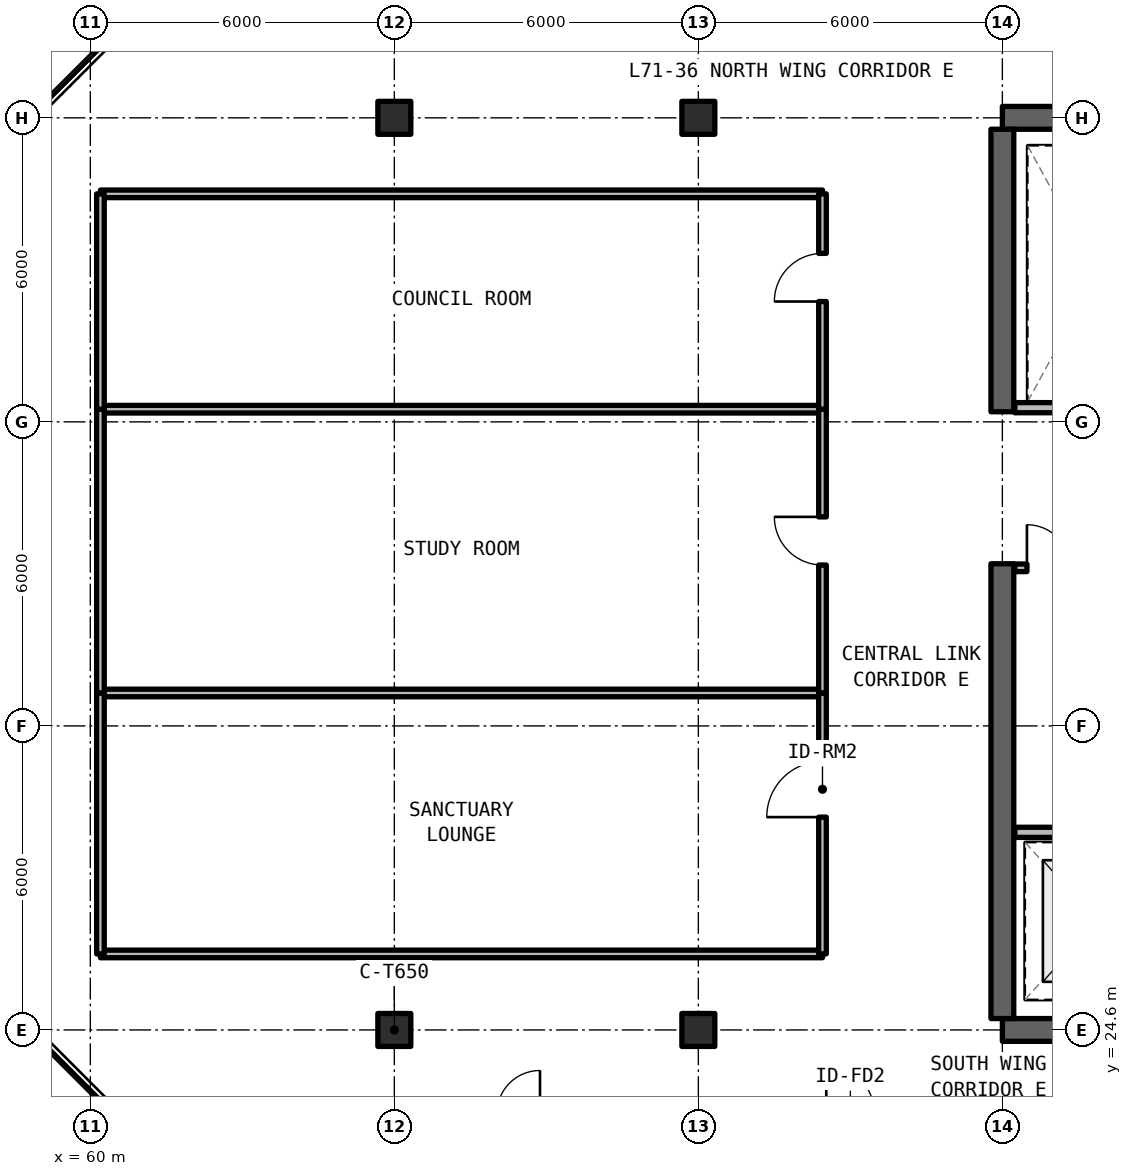
"""IFC4 building model, lengths in metres.
Left out: names, types, materials, properties, quantities, classifications, styles, units other than length and angle.
Written with IfcOpenShell. Run it as: python <this file> out.ifc"""

import sys

from ifc_helpers import new_model, si_unit, direction, frame, frame_2d, origin, origin_2d, place, context, subcontext, project, spatial, rectangle, extrude, element, fill, save


model = new_model("IFC4")
c1 = context("Model", 3, precision=1e-05, world=origin(), true_north=direction((0.0, 1.0)))
c2 = subcontext(c1, "Body", "Model", "MODEL_VIEW")
j1 = project(units=[si_unit("LENGTHUNIT", "METRE"), si_unit("PLANEANGLEUNIT", "RADIAN")], contexts=[c1])
p1 = place(None, origin())
s1 = spatial("IfcSite", under=j1, at=p1, CompositionType="ELEMENT")
p2 = place(p1, origin())
s2 = spatial("IfcBuilding", under=s1, at=p2, CompositionType="ELEMENT")
p3 = place(p2, frame((0.0, 0.0, 253.44)))
s3 = spatial("IfcBuildingStorey", under=s2, at=p3, CompositionType="ELEMENT", Elevation=253.44)
for number, where, z_axis, x_axis in (
    (1, (78.0, 24.6, 0.0), (0.0, 0.0, 1.0), (1.0, 0.0, 0.0)),
    (2, (90.0, 42.6, 0.0), (0.0, 0.0, 1.0), (-1.0, 0.0, 0.0)),
):
    element("IfcWall", number, at=place(p3, frame(where, z_axis=z_axis, x_axis=x_axis)), inside=s3, PredefinedType="SHEAR", context=c2, shape_type="SweptSolid", body=[
        extrude(rectangle(XDim=12.0, YDim=0.45, at=frame_2d((6.0, 0.0))), origin(), (0.0, 0.0, 1.0), 3.63),
    ])
p4 = place(p3, frame((78.0, 24.825, 0.0), z_axis=(0.0, 0.0, 1.0), x_axis=(0.0, 1.0, 0.0)))
e3 = element("IfcWall", 3, at=p4, inside=s3, PredefinedType="SHEAR", context=c2, shape_type="SweptSolid", body=[
    extrude(rectangle(XDim=8.975, YDim=0.45, at=frame_2d((4.488, 0.0))), origin(), (0.0, 0.0, 1.0), 3.63),
])
p5 = place(p3, frame((78.0, 36.8, 0.0), z_axis=(0.0, 0.0, 1.0), x_axis=(0.0, 1.0, 0.0)))
e4 = element("IfcWall", 4, at=p5, inside=s3, PredefinedType="SHEAR", context=c2, shape_type="SweptSolid", body=[
    extrude(rectangle(XDim=5.575, YDim=0.45, at=frame_2d((2.788, 0.0))), origin(), (0.0, 0.0, 1.0), 3.63),
])
for number, where, z_axis, x_axis in (
    (5, (66.0, 24.6, 0.0), (0.0, 0.0, 1.0), (1.0, 0.0, 0.0)),
    (6, (66.0, 42.6, 0.0), (0.0, 0.0, 1.0), (1.0, 0.0, 0.0)),
    (7, (72.0, 24.6, 0.0), (0.0, 0.0, 1.0), (1.0, 0.0, 0.0)),
    (8, (72.0, 42.6, 0.0), (0.0, 0.0, 1.0), (1.0, 0.0, 0.0)),
):
    element("IfcColumn", number, at=place(p3, frame(where, z_axis=z_axis, x_axis=x_axis)), inside=s3, PredefinedType="COLUMN", context=c2, shape_type="SweptSolid", body=[
        extrude(rectangle(XDim=0.65, YDim=0.65, at=origin_2d()), origin(), (0.0, 0.0, 1.0), 3.63),
    ])
p6 = place(p3, frame((78.245, 28.5, 0.0), z_axis=(0.0, 0.0, 1.0), x_axis=(1.0, 0.0, 0.0)))
e9 = element("IfcWall", 9, at=p6, inside=s3, PredefinedType="SOLIDWALL", context=c2, shape_type="SweptSolid", body=[
    extrude(rectangle(XDim=7.585, YDim=0.2, at=frame_2d((3.792, 0.0))), origin(), (0.0, 0.0, 1.0), 2.63),
])
p7 = place(p6, frame((3.555, 0.0, 0.0)))
e10 = element("IfcOpeningElement", 10, at=p7, cuts=e9, PredefinedType="OPENING", context=c2, shape_type="SweptSolid", body=[
    extrude(rectangle(XDim=1.0, YDim=2.15, at=frame_2d((0.5, 1.075))), frame((0.0, 0.11, 0.0), z_axis=(0.0, -1.0, 0.0), x_axis=(1.0, 0.0, 0.0)), (0.0, 0.0, 1.0), 0.22),
])
p8 = place(p3, frame((78.245, 33.72, 0.0), z_axis=(0.0, 0.0, 1.0), x_axis=(1.0, 0.0, 0.0)))
e11 = element("IfcWall", 11, at=p8, inside=s3, PredefinedType="SOLIDWALL", context=c2, shape_type="SweptSolid", body=[
    extrude(rectangle(XDim=1.395, YDim=0.15, at=frame_2d((0.697, 0.0))), origin(), (0.0, 0.0, 1.0), 2.63),
])
p9 = place(p8, frame((0.24, 0.0, 0.0)))
e12 = element("IfcOpeningElement", 12, at=p9, cuts=e11, PredefinedType="OPENING", context=c2, shape_type="SweptSolid", body=[
    extrude(rectangle(XDim=0.85, YDim=2.1, at=frame_2d((0.425, 1.05))), frame((0.0, 0.085, 0.0), z_axis=(0.0, -1.0, 0.0), x_axis=(1.0, 0.0, 0.0)), (0.0, 0.0, 1.0), 0.17),
])
p10 = place(p3, frame((78.245, 36.88, 0.0), z_axis=(0.0, 0.0, 1.0), x_axis=(1.0, 0.0, 0.0)))
e13 = element("IfcWall", 13, at=p10, inside=s3, PredefinedType="SOLIDWALL", context=c2, shape_type="SweptSolid", body=[
    extrude(rectangle(XDim=3.075, YDim=0.2, at=frame_2d((1.538, 0.0))), origin(), (0.0, 0.0, 1.0), 2.63),
])
for number, where, z_axis, x_axis in (
    (14, (60.2, 26.1, 0.0), (0.0, 0.0, 1.0), (1.0, 0.0, 0.0)),
    (15, (60.2, 31.25, 0.0), (0.0, 0.0, 1.0), (1.0, 0.0, 0.0)),
):
    element("IfcWall", number, at=place(p3, frame(where, z_axis=z_axis, x_axis=x_axis)), inside=s3, PredefinedType="SOLIDWALL", context=c2, shape_type="SweptSolid", body=[
        extrude(rectangle(XDim=14.25, YDim=0.15, at=frame_2d((7.125, 0.0))), origin(), (0.0, 0.0, 1.0), 2.63),
    ])
p11 = place(p3, frame((60.2, 26.1, 0.0), z_axis=(0.0, 0.0, 1.0), x_axis=(0.0, 1.0, 0.0)))
e16 = element("IfcWall", 16, at=p11, inside=s3, PredefinedType="SOLIDWALL", context=c2, shape_type="SweptSolid", body=[
    extrude(rectangle(XDim=5.15, YDim=0.15, at=frame_2d((2.575, 0.0))), origin(), (0.0, 0.0, 1.0), 2.63),
])
p12 = place(p3, frame((74.45, 26.1, 0.0), z_axis=(0.0, 0.0, 1.0), x_axis=(0.0, 1.0, 0.0)))
e17 = element("IfcWall", 17, at=p12, inside=s3, PredefinedType="SOLIDWALL", context=c2, shape_type="SweptSolid", body=[
    extrude(rectangle(XDim=5.15, YDim=0.15, at=frame_2d((2.575, 0.0))), origin(), (0.0, 0.0, 1.0), 2.63),
])
p13 = place(p12, frame((2.7, 0.0, 0.0)))
e18 = element("IfcOpeningElement", 18, at=p13, cuts=e17, PredefinedType="OPENING", context=c2, shape_type="SweptSolid", body=[
    extrude(rectangle(XDim=1.1, YDim=2.15, at=frame_2d((0.55, 1.075))), frame((0.0, 0.085, 0.0), z_axis=(0.0, -1.0, 0.0), x_axis=(1.0, 0.0, 0.0)), (0.0, 0.0, 1.0), 0.17),
])
p14 = place(p3, frame((60.2, 36.85, 0.0), z_axis=(0.0, 0.0, 1.0), x_axis=(1.0, 0.0, 0.0)))
e19 = element("IfcWall", 19, at=p14, inside=s3, PredefinedType="SOLIDWALL", context=c2, shape_type="SweptSolid", body=[
    extrude(rectangle(XDim=14.25, YDim=0.15, at=frame_2d((7.125, 0.0))), origin(), (0.0, 0.0, 1.0), 2.63),
])
p15 = place(p3, frame((60.2, 31.25, 0.0), z_axis=(0.0, 0.0, 1.0), x_axis=(0.0, 1.0, 0.0)))
e20 = element("IfcWall", 20, at=p15, inside=s3, PredefinedType="SOLIDWALL", context=c2, shape_type="SweptSolid", body=[
    extrude(rectangle(XDim=5.6, YDim=0.15, at=frame_2d((2.8, 0.0))), origin(), (0.0, 0.0, 1.0), 2.63),
])
p16 = place(p3, frame((74.45, 31.25, 0.0), z_axis=(0.0, 0.0, 1.0), x_axis=(0.0, 1.0, 0.0)))
e21 = element("IfcWall", 21, at=p16, inside=s3, PredefinedType="SOLIDWALL", context=c2, shape_type="SweptSolid", body=[
    extrude(rectangle(XDim=5.6, YDim=0.15, at=frame_2d((2.8, 0.0))), origin(), (0.0, 0.0, 1.0), 2.63),
])
p17 = place(p16, frame((2.525, 0.0, 0.0)))
e22 = element("IfcOpeningElement", 22, at=p17, cuts=e21, PredefinedType="OPENING", context=c2, shape_type="SweptSolid", body=[
    extrude(rectangle(XDim=0.95, YDim=2.15, at=frame_2d((0.475, 1.075))), frame((0.0, 0.085, 0.0), z_axis=(0.0, -1.0, 0.0), x_axis=(1.0, 0.0, 0.0)), (0.0, 0.0, 1.0), 0.17),
])
p18 = place(p3, frame((60.2, 41.1, 0.0), z_axis=(0.0, 0.0, 1.0), x_axis=(1.0, 0.0, 0.0)))
e23 = element("IfcWall", 23, at=p18, inside=s3, PredefinedType="SOLIDWALL", context=c2, shape_type="SweptSolid", body=[
    extrude(rectangle(XDim=14.25, YDim=0.15, at=frame_2d((7.125, 0.0))), origin(), (0.0, 0.0, 1.0), 2.63),
])
p19 = place(p3, frame((60.2, 36.85, 0.0), z_axis=(0.0, 0.0, 1.0), x_axis=(0.0, 1.0, 0.0)))
e24 = element("IfcWall", 24, at=p19, inside=s3, PredefinedType="SOLIDWALL", context=c2, shape_type="SweptSolid", body=[
    extrude(rectangle(XDim=4.25, YDim=0.15, at=frame_2d((2.125, 0.0))), origin(), (0.0, 0.0, 1.0), 2.63),
])
p20 = place(p3, frame((74.45, 36.85, 0.0), z_axis=(0.0, 0.0, 1.0), x_axis=(0.0, 1.0, 0.0)))
e25 = element("IfcWall", 25, at=p20, inside=s3, PredefinedType="SOLIDWALL", context=c2, shape_type="SweptSolid", body=[
    extrude(rectangle(XDim=4.25, YDim=0.15, at=frame_2d((2.125, 0.0))), origin(), (0.0, 0.0, 1.0), 2.63),
])
p21 = place(p20, frame((2.125, 0.0, 0.0)))
e26 = element("IfcOpeningElement", 26, at=p21, cuts=e25, PredefinedType="OPENING", context=c2, shape_type="SweptSolid", body=[
    extrude(rectangle(XDim=0.95, YDim=2.15, at=frame_2d((0.475, 1.075))), frame((0.0, 0.085, 0.0), z_axis=(0.0, -1.0, 0.0), x_axis=(1.0, 0.0, 0.0)), (0.0, 0.0, 1.0), 0.17),
])
p22 = place(p9, origin())
e27 = element("IfcDoor", 27, at=p22, inside=s3, OperationType="SINGLE_SWING_LEFT", PredefinedType="DOOR", context=c2, shape_type="SweptSolid", body=[
    extrude(rectangle(XDim=0.85, YDim=2.1, at=frame_2d((0.425, 1.05))), frame((0.0, 0.025, 0.0), z_axis=(0.0, -1.0, 0.0), x_axis=(1.0, 0.0, 0.0)), (0.0, 0.0, 1.0), 0.05),
])
fill(e12, e27)
p23 = place(p13, origin())
e28 = element("IfcDoor", 28, at=p23, inside=s3, OperationType="SINGLE_SWING_LEFT", PredefinedType="DOOR", context=c2, shape_type="SweptSolid", body=[
    extrude(rectangle(XDim=1.1, YDim=2.15, at=frame_2d((0.55, 1.075))), frame((0.0, 0.025, 0.0), z_axis=(0.0, -1.0, 0.0), x_axis=(1.0, 0.0, 0.0)), (0.0, 0.0, 1.0), 0.05),
])
fill(e18, e28)
p24 = place(p17, origin())
e29 = element("IfcDoor", 29, at=p24, inside=s3, OperationType="SINGLE_SWING_RIGHT", PredefinedType="DOOR", context=c2, shape_type="SweptSolid", body=[
    extrude(rectangle(XDim=0.95, YDim=2.15, at=frame_2d((0.475, 1.075))), frame((0.0, 0.025, 0.0), z_axis=(0.0, -1.0, 0.0), x_axis=(1.0, 0.0, 0.0)), (0.0, 0.0, 1.0), 0.05),
])
fill(e22, e29)
p25 = place(p21, origin())
e30 = element("IfcDoor", 30, at=p25, inside=s3, OperationType="SINGLE_SWING_LEFT", PredefinedType="DOOR", context=c2, shape_type="SweptSolid", body=[
    extrude(rectangle(XDim=0.95, YDim=2.15, at=frame_2d((0.475, 1.075))), frame((0.0, 0.025, 0.0), z_axis=(0.0, -1.0, 0.0), x_axis=(1.0, 0.0, 0.0)), (0.0, 0.0, 1.0), 0.05),
])
fill(e26, e30)
save(model, sys.argv[1])
